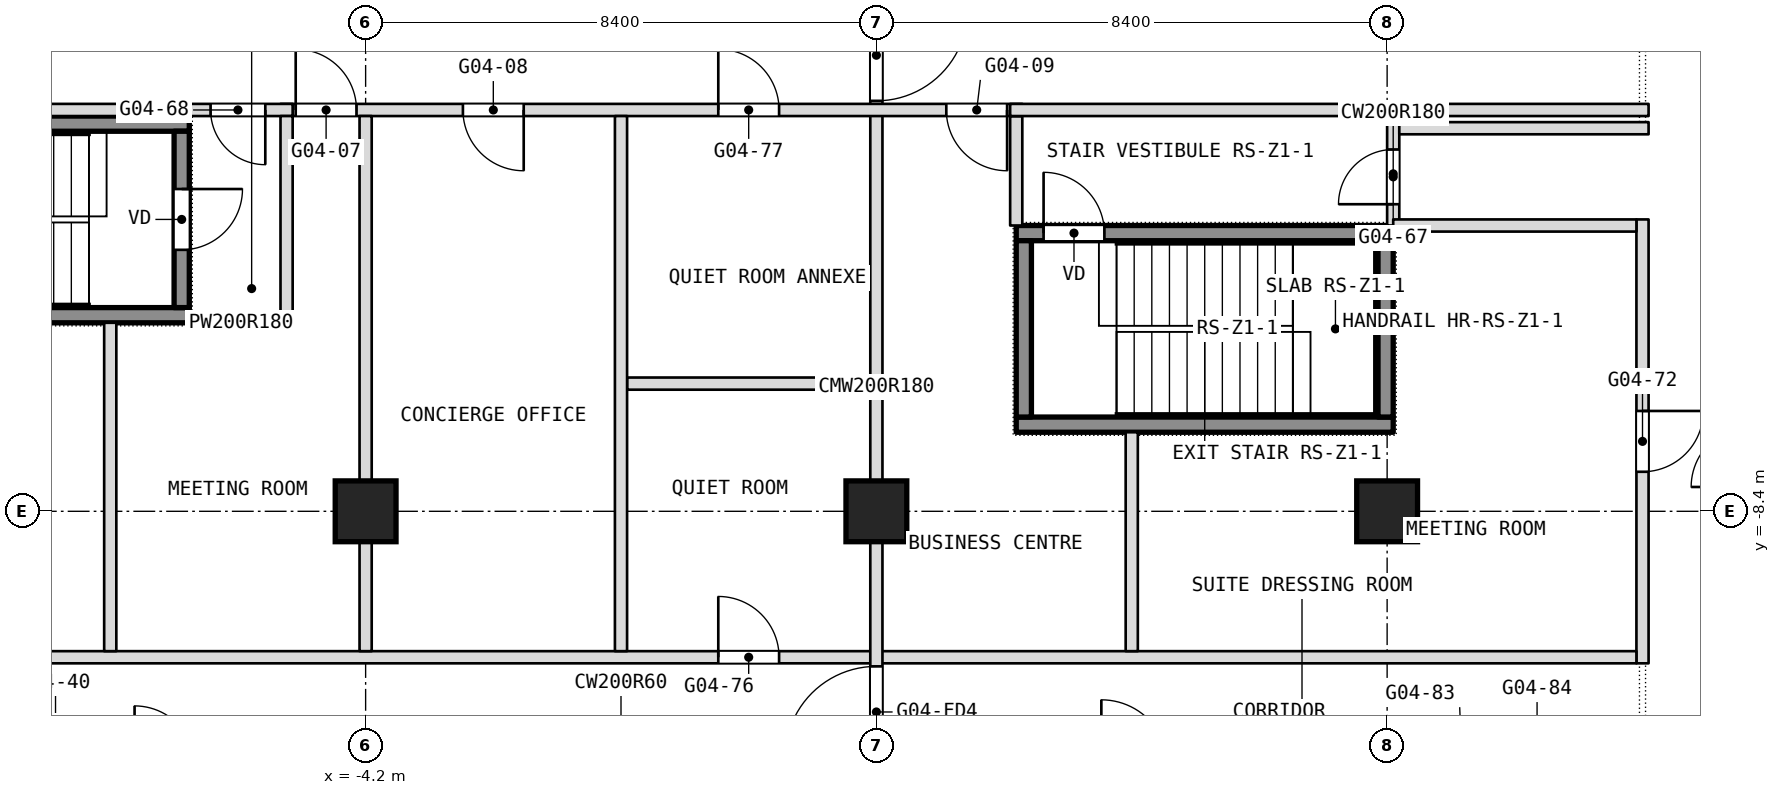
"""IFC4 building model, lengths in metres.
Left out: names, types, materials, properties, quantities, classifications, styles, units other than length and angle.
Written with IfcOpenShell. Run it as: python <this file> out.ifc"""

import sys

from ifc_helpers import new_model, si_unit, direction, frame, frame_2d, origin, origin_2d, place, context, subcontext, project, spatial, rectangle, extrude, element, fill, save


model = new_model("IFC4")
c1 = context("Model", 3, precision=1e-05, world=origin(), true_north=direction((0.0, 1.0)))
c2 = subcontext(c1, "Body", "Model", "MODEL_VIEW")
j1 = project(units=[si_unit("LENGTHUNIT", "METRE"), si_unit("PLANEANGLEUNIT", "RADIAN")], contexts=[c1])
p1 = place(None, origin())
s1 = spatial("IfcSite", under=j1, at=p1, CompositionType="ELEMENT")
p2 = place(p1, origin())
s2 = spatial("IfcBuilding", under=s1, at=p2, CompositionType="ELEMENT")
p3 = place(p2, frame((0.0, 0.0, 61.7)))
s3 = spatial("IfcBuildingStorey", under=s2, at=p3, CompositionType="ELEMENT", Elevation=61.7)
for number, where, z_axis, x_axis in (
    (1, (-4.2, -8.4, 0.0), (0.0, 0.0, 1.0), (1.0, 0.0, 0.0)),
    (2, (4.2, -8.4, 0.0), (0.0, 0.0, 1.0), (1.0, 0.0, 0.0)),
    (3, (12.6, -8.4, 0.0), (0.0, 0.0, 1.0), (1.0, 0.0, 0.0)),
):
    element("IfcColumn", number, at=place(p3, frame(where, z_axis=z_axis, x_axis=x_axis)), inside=s3, PredefinedType="COLUMN", context=c2, shape_type="SweptSolid", body=[
        extrude(rectangle(XDim=1.0, YDim=1.0, at=origin_2d()), origin(), (0.0, 0.0, 1.0), 3.6),
    ])
p4 = place(p3, frame((16.8, -10.9, 0.0), z_axis=(0.0, 0.0, 1.0), x_axis=(0.0, 1.0, 0.0)))
e4 = element("IfcWall", 4, at=p4, inside=s3, PredefinedType="PARTITIONING", context=c2, shape_type="SweptSolid", body=[
    extrude(rectangle(XDim=7.3, YDim=0.2, at=frame_2d((3.65, 0.0))), origin(), (0.0, 0.0, 1.0), 3.34),
])
p5 = place(p4, frame((3.15, 0.0, 0.0)))
e5 = element("IfcOpeningElement", 5, at=p5, cuts=e4, PredefinedType="OPENING", context=c2, shape_type="SweptSolid", body=[
    extrude(rectangle(XDim=1.0, YDim=2.1, at=frame_2d((0.5, 1.05))), frame((0.0, 0.1, 0.0), z_axis=(0.0, -1.0, 0.0), x_axis=(1.0, 0.0, 0.0)), (0.0, 0.0, 1.0), 0.2),
])
p6 = place(p3, frame((12.7, -3.7, 0.0), z_axis=(0.0, 0.0, 1.0), x_axis=(0.0, 1.0, 0.0)))
e6 = element("IfcWall", 6, at=p6, inside=s3, PredefinedType="PARTITIONING", context=c2, shape_type="SweptSolid", body=[
    extrude(rectangle(XDim=1.7, YDim=0.2, at=frame_2d((0.85, 0.0))), origin(), (0.0, 0.0, 1.0), 3.34),
])
p7 = place(p6, frame((0.35, 0.0, 0.0)))
e7 = element("IfcOpeningElement", 7, at=p7, cuts=e6, PredefinedType="OPENING", context=c2, shape_type="SweptSolid", body=[
    extrude(rectangle(XDim=0.9, YDim=2.1, at=frame_2d((0.45, 1.05))), frame((0.0, 0.1, 0.0), z_axis=(0.0, -1.0, 0.0), x_axis=(1.0, 0.0, 0.0)), (0.0, 0.0, 1.0), 0.2),
])
p8 = place(p3, frame((-16.7, -10.8, 0.0), z_axis=(0.0, 0.0, 1.0), x_axis=(1.0, 0.0, 0.0)))
e8 = element("IfcWall", 8, at=p8, inside=s3, PredefinedType="PARTITIONING", context=c2, shape_type="SweptSolid", body=[
    extrude(rectangle(XDim=33.4, YDim=0.2, at=frame_2d((16.7, 0.0))), origin(), (0.0, 0.0, 1.0), 3.34),
])
p9 = place(p8, frame((5.7, 0.0, 0.0)))
e9 = element("IfcOpeningElement", 9, at=p9, cuts=e8, PredefinedType="OPENING", context=c2, shape_type="SweptSolid", body=[
    extrude(rectangle(XDim=1.0, YDim=2.1, at=frame_2d((0.5, 1.05))), frame((0.0, 0.1, 0.0), z_axis=(0.0, -1.0, 0.0), x_axis=(1.0, 0.0, 0.0)), (0.0, 0.0, 1.0), 0.2),
])
p10 = place(p8, frame((18.3, 0.0, 0.0)))
e10 = element("IfcOpeningElement", 10, at=p10, cuts=e8, PredefinedType="OPENING", context=c2, shape_type="SweptSolid", body=[
    extrude(rectangle(XDim=1.0, YDim=2.1, at=frame_2d((0.5, 1.05))), frame((0.0, 0.1, 0.0), z_axis=(0.0, -1.0, 0.0), x_axis=(1.0, 0.0, 0.0)), (0.0, 0.0, 1.0), 0.2),
])
p11 = place(p3, frame((8.4, -10.7, 0.0), z_axis=(0.0, 0.0, 1.0), x_axis=(0.0, 1.0, 0.0)))
e11 = element("IfcWall", 11, at=p11, inside=s3, PredefinedType="PARTITIONING", context=c2, shape_type="SweptSolid", body=[
    extrude(rectangle(XDim=3.6, YDim=0.2, at=frame_2d((1.8, 0.0))), origin(), (0.0, 0.0, 1.0), 3.34),
])
p12 = place(p3, frame((6.5, -3.7, 0.0), z_axis=(0.0, 0.0, 1.0), x_axis=(0.0, 1.0, 0.0)))
e12 = element("IfcWall", 12, at=p12, inside=s3, PredefinedType="PARTITIONING", context=c2, shape_type="SweptSolid", body=[
    extrude(rectangle(XDim=1.8, YDim=0.2, at=frame_2d((0.9, 0.0))), origin(), (0.0, 0.0, 1.0), 3.34),
])
p13 = place(p3, frame((0.1, -6.3, 0.0), z_axis=(0.0, 0.0, 1.0), x_axis=(1.0, 0.0, 0.0)))
e13 = element("IfcWall", 13, at=p13, inside=s3, PredefinedType="PARTITIONING", context=c2, shape_type="SweptSolid", body=[
    extrude(rectangle(XDim=4.0, YDim=0.2, at=frame_2d((2.0, 0.0))), origin(), (0.0, 0.0, 1.0), 3.34),
])
p14 = place(p3, frame((-7.1, -5.3, 0.0), z_axis=(0.0, 0.0, 1.0), x_axis=(1.0, 0.0, 0.0)))
e14 = element("IfcWall", 14, at=p14, inside=s3, PredefinedType="PARTITIONING", context=c2, shape_type="SweptSolid", body=[
    extrude(rectangle(XDim=1.7, YDim=0.2, at=frame_2d((0.85, 0.0))), origin(), (0.0, 0.0, 1.0), 3.34),
])
p15 = place(p3, frame((4.2, -12.7, 0.0), z_axis=(0.0, 0.0, 1.0), x_axis=(0.0, 1.0, 0.0)))
e15 = element("IfcWall", 15, at=p15, inside=s3, PredefinedType="PARTITIONING", context=c2, shape_type="SweptSolid", body=[
    extrude(rectangle(XDim=12.7, YDim=0.2, at=frame_2d((6.35, 0.0))), origin(), (0.0, 0.0, 1.0), 3.34),
])
p16 = place(p15, frame((11.05, 0.0, 0.0)))
e16 = element("IfcOpeningElement", 16, at=p16, cuts=e15, PredefinedType="OPENING", context=c2, shape_type="SweptSolid", body=[
    extrude(rectangle(XDim=1.5, YDim=2.1, at=frame_2d((0.75, 1.05))), frame((0.0, 0.1, 0.0), z_axis=(0.0, -1.0, 0.0), x_axis=(1.0, 0.0, 0.0)), (0.0, 0.0, 1.0), 0.2),
])
p17 = place(p15, frame((0.25, 0.0, 0.0)))
e17 = element("IfcOpeningElement", 17, at=p17, cuts=e15, PredefinedType="OPENING", context=c2, shape_type="SweptSolid", body=[
    extrude(rectangle(XDim=1.5, YDim=2.1, at=frame_2d((0.75, 1.05))), frame((0.0, 0.1, 0.0), z_axis=(0.0, -1.0, 0.0), x_axis=(1.0, 0.0, 0.0)), (0.0, 0.0, 1.0), 0.2),
])
p18 = place(p3, frame((12.7, -3.7, 0.0), z_axis=(0.0, 0.0, 1.0), x_axis=(1.0, 0.0, 0.0)))
e18 = element("IfcWall", 18, at=p18, inside=s3, PredefinedType="PARTITIONING", context=c2, shape_type="SweptSolid", body=[
    extrude(rectangle(XDim=4.0, YDim=0.2, at=frame_2d((2.0, 0.0))), origin(), (0.0, 0.0, 1.0), 3.34),
])
p19 = place(p3, frame((12.8, -2.1, 0.0), z_axis=(0.0, 0.0, 1.0), x_axis=(1.0, 0.0, 0.0)))
e19 = element("IfcWall", 19, at=p19, inside=s3, PredefinedType="PARTITIONING", context=c2, shape_type="SweptSolid", body=[
    extrude(rectangle(XDim=4.1, YDim=0.2, at=frame_2d((2.05, 0.0))), origin(), (0.0, 0.0, 1.0), 3.34),
])
p20 = place(p3, frame((-5.6, -1.8, 0.0), z_axis=(0.0, 0.0, 1.0), x_axis=(1.0, 0.0, 0.0)))
e20 = element("IfcWall", 20, at=p20, inside=s3, PredefinedType="PARTITIONING", context=c2, shape_type="SweptSolid", body=[
    extrude(rectangle(XDim=12.2, YDim=0.2, at=frame_2d((6.1, 0.0))), origin(), (0.0, 0.0, 1.0), 3.34),
])
p21 = place(p20, frame((0.25, 0.0, 0.0)))
e21 = element("IfcOpeningElement", 21, at=p21, cuts=e20, PredefinedType="OPENING", context=c2, shape_type="SweptSolid", body=[
    extrude(rectangle(XDim=1.0, YDim=2.1, at=frame_2d((0.5, 1.05))), frame((0.0, 0.1, 0.0), z_axis=(0.0, -1.0, 0.0), x_axis=(1.0, 0.0, 0.0)), (0.0, 0.0, 1.0), 0.2),
])
p22 = place(p20, frame((3.0, 0.0, 0.0)))
e22 = element("IfcOpeningElement", 22, at=p22, cuts=e20, PredefinedType="OPENING", context=c2, shape_type="SweptSolid", body=[
    extrude(rectangle(XDim=1.0, YDim=2.1, at=frame_2d((0.5, 1.05))), frame((0.0, 0.1, 0.0), z_axis=(0.0, -1.0, 0.0), x_axis=(1.0, 0.0, 0.0)), (0.0, 0.0, 1.0), 0.2),
])
p23 = place(p20, frame((10.95, 0.0, 0.0)))
e23 = element("IfcOpeningElement", 23, at=p23, cuts=e20, PredefinedType="OPENING", context=c2, shape_type="SweptSolid", body=[
    extrude(rectangle(XDim=1.0, YDim=2.1, at=frame_2d((0.5, 1.05))), frame((0.0, 0.1, 0.0), z_axis=(0.0, -1.0, 0.0), x_axis=(1.0, 0.0, 0.0)), (0.0, 0.0, 1.0), 0.2),
])
p24 = place(p20, frame((7.2, 0.0, 0.0)))
e24 = element("IfcOpeningElement", 24, at=p24, cuts=e20, PredefinedType="OPENING", context=c2, shape_type="SweptSolid", body=[
    extrude(rectangle(XDim=1.0, YDim=2.1, at=frame_2d((0.5, 1.05))), frame((0.0, 0.1, 0.0), z_axis=(0.0, -1.0, 0.0), x_axis=(1.0, 0.0, 0.0)), (0.0, 0.0, 1.0), 0.2),
])
p25 = place(p3, frame((-13.3, -1.8, 0.0), z_axis=(0.0, 0.0, 1.0), x_axis=(1.0, 0.0, 0.0)))
e25 = element("IfcWall", 25, at=p25, inside=s3, PredefinedType="PARTITIONING", context=c2, shape_type="SweptSolid", body=[
    extrude(rectangle(XDim=7.9, YDim=0.2, at=frame_2d((3.95, 0.0))), origin(), (0.0, 0.0, 1.0), 3.34),
])
p26 = place(p25, frame((6.55, 0.0, 0.0)))
e26 = element("IfcOpeningElement", 26, at=p26, cuts=e25, PredefinedType="OPENING", context=c2, shape_type="SweptSolid", body=[
    extrude(rectangle(XDim=0.9, YDim=2.1, at=frame_2d((0.45, 1.05))), frame((0.0, 0.1, 0.0), z_axis=(0.0, -1.0, 0.0), x_axis=(1.0, 0.0, 0.0)), (0.0, 0.0, 1.0), 0.2),
])
p27 = place(p3, frame((6.4, -1.8, 0.0), z_axis=(0.0, 0.0, 1.0), x_axis=(1.0, 0.0, 0.0)))
e27 = element("IfcWall", 27, at=p27, inside=s3, PredefinedType="PARTITIONING", context=c2, shape_type="SweptSolid", body=[
    extrude(rectangle(XDim=10.5, YDim=0.2, at=frame_2d((5.25, 0.0))), origin(), (0.0, 0.0, 1.0), 3.34),
])
for number, where, z_axis, x_axis in (
    (28, (0.0, -10.7, 0.0), (0.0, 0.0, 1.0), (0.0, 1.0, 0.0)),
    (29, (-4.2, -10.7, 0.0), (0.0, 0.0, 1.0), (0.0, 1.0, 0.0)),
):
    element("IfcWall", number, at=place(p3, frame(where, z_axis=z_axis, x_axis=x_axis)), inside=s3, PredefinedType="PARTITIONING", context=c2, shape_type="SweptSolid", body=[
        extrude(rectangle(XDim=8.8, YDim=0.2, at=frame_2d((4.4, 0.0))), origin(), (0.0, 0.0, 1.0), 3.34),
    ])
p28 = place(p3, frame((-5.5, -5.2, 0.0), z_axis=(0.0, 0.0, 1.0), x_axis=(0.0, 1.0, 0.0)))
e30 = element("IfcWall", 30, at=p28, inside=s3, PredefinedType="PARTITIONING", context=c2, shape_type="SweptSolid", body=[
    extrude(rectangle(XDim=3.3, YDim=0.2, at=frame_2d((1.65, 0.0))), origin(), (0.0, 0.0, 1.0), 3.34),
])
p29 = place(p3, frame((-8.4, -10.7, 0.0), z_axis=(0.0, 0.0, 1.0), x_axis=(0.0, 1.0, 0.0)))
e31 = element("IfcWall", 31, at=p29, inside=s3, PredefinedType="PARTITIONING", context=c2, shape_type="SweptSolid", body=[
    extrude(rectangle(XDim=5.4, YDim=0.2, at=frame_2d((2.7, 0.0))), origin(), (0.0, 0.0, 1.0), 3.34),
])
p30 = place(p3, frame((6.5, -6.975, 0.1), z_axis=(0.0, 0.0, 1.0), x_axis=(1.0, 0.0, 0.0)))
e32 = element("IfcWall", 32, at=p30, inside=s3, PredefinedType="SHEAR", context=c2, shape_type="SweptSolid", body=[
    extrude(rectangle(XDim=6.2, YDim=0.25, at=frame_2d((3.1, 0.0))), origin(), (0.0, 0.0, 1.0), 3.6),
])
p31 = place(p3, frame((6.5, -3.825, 0.1), z_axis=(0.0, 0.0, 1.0), x_axis=(1.0, 0.0, 0.0)))
e33 = element("IfcWall", 33, at=p31, inside=s3, PredefinedType="SHEAR", context=c2, shape_type="SweptSolid", body=[
    extrude(rectangle(XDim=6.2, YDim=0.25, at=frame_2d((3.1, 0.0))), origin(), (0.0, 0.0, 1.0), 3.6),
])
p32 = place(p31, frame((0.45, 0.0, 0.0)))
e34 = element("IfcOpeningElement", 34, at=p32, cuts=e33, PredefinedType="OPENING", context=c2, shape_type="SweptSolid", body=[
    extrude(rectangle(XDim=1.0, YDim=2.1, at=frame_2d((0.5, 1.05))), frame((0.0, 0.125, 0.0), z_axis=(0.0, -1.0, 0.0), x_axis=(1.0, 0.0, 0.0)), (0.0, 0.0, 1.0), 0.25),
])
for number, where, z_axis, x_axis in (
    (35, (6.625, -6.85, 0.1), (0.0, 0.0, 1.0), (0.0, 1.0, 0.0)),
    (36, (12.575, -6.85, 0.1), (0.0, 0.0, 1.0), (0.0, 1.0, 0.0)),
):
    element("IfcWall", number, at=place(p3, frame(where, z_axis=z_axis, x_axis=x_axis)), inside=s3, PredefinedType="SHEAR", context=c2, shape_type="SweptSolid", body=[
        extrude(rectangle(XDim=2.9, YDim=0.25, at=frame_2d((1.45, 0.0))), origin(), (0.0, 0.0, 1.0), 3.6),
    ])
for number, where, z_axis, x_axis in (
    (37, (-13.3, -5.175, 0.1), (0.0, 0.0, 1.0), (1.0, 0.0, 0.0)),
    (38, (-13.3, -2.025, 0.1), (0.0, 0.0, 1.0), (1.0, 0.0, 0.0)),
):
    element("IfcWall", number, at=place(p3, frame(where, z_axis=z_axis, x_axis=x_axis)), inside=s3, PredefinedType="SHEAR", context=c2, shape_type="SweptSolid", body=[
        extrude(rectangle(XDim=6.2, YDim=0.25, at=frame_2d((3.1, 0.0))), origin(), (0.0, 0.0, 1.0), 3.6),
    ])
p33 = place(p3, frame((-7.225, -5.05, 0.1), z_axis=(0.0, 0.0, 1.0), x_axis=(0.0, 1.0, 0.0)))
e39 = element("IfcWall", 39, at=p33, inside=s3, PredefinedType="SHEAR", context=c2, shape_type="SweptSolid", body=[
    extrude(rectangle(XDim=2.9, YDim=0.25, at=frame_2d((1.45, 0.0))), origin(), (0.0, 0.0, 1.0), 3.6),
])
p34 = place(p33, frame((0.95, 0.0, 0.0)))
e40 = element("IfcOpeningElement", 40, at=p34, cuts=e39, PredefinedType="OPENING", context=c2, shape_type="SweptSolid", body=[
    extrude(rectangle(XDim=1.0, YDim=2.1, at=frame_2d((0.5, 1.05))), frame((0.0, 0.125, 0.0), z_axis=(0.0, -1.0, 0.0), x_axis=(1.0, 0.0, 0.0)), (0.0, 0.0, 1.0), 0.25),
])
p35 = place(p5, origin())
e41 = element("IfcDoor", 41, at=p35, inside=s3, OperationType="SINGLE_SWING_RIGHT", PredefinedType="DOOR", context=c2, shape_type="SweptSolid", body=[
    extrude(rectangle(XDim=1.0, YDim=2.1, at=frame_2d((0.5, 1.05))), frame((0.0, 0.025, 0.0), z_axis=(0.0, -1.0, 0.0), x_axis=(1.0, 0.0, 0.0)), (0.0, 0.0, 1.0), 0.05),
])
fill(e5, e41)
p36 = place(p7, origin())
e42 = element("IfcDoor", 42, at=p36, inside=s3, OperationType="SINGLE_SWING_RIGHT", PredefinedType="DOOR", context=c2, shape_type="SweptSolid", body=[
    extrude(rectangle(XDim=0.9, YDim=2.1, at=frame_2d((0.45, 1.05))), frame((0.0, 0.025, 0.0), z_axis=(0.0, -1.0, 0.0), x_axis=(1.0, 0.0, 0.0)), (0.0, 0.0, 1.0), 0.05),
])
fill(e7, e42)
p37 = place(p10, origin())
e43 = element("IfcDoor", 43, at=p37, inside=s3, OperationType="SINGLE_SWING_RIGHT", PredefinedType="DOOR", context=c2, shape_type="SweptSolid", body=[
    extrude(rectangle(XDim=1.0, YDim=2.1, at=frame_2d((0.5, 1.05))), frame((0.0, 0.025, 0.0), z_axis=(0.0, -1.0, 0.0), x_axis=(1.0, 0.0, 0.0)), (0.0, 0.0, 1.0), 0.05),
])
fill(e10, e43)
p38 = place(p21, origin())
e44 = element("IfcDoor", 44, at=p38, inside=s3, OperationType="SINGLE_SWING_RIGHT", PredefinedType="DOOR", context=c2, shape_type="SweptSolid", body=[
    extrude(rectangle(XDim=1.0, YDim=2.1, at=frame_2d((0.5, 1.05))), frame((0.0, 0.025, 0.0), z_axis=(0.0, -1.0, 0.0), x_axis=(1.0, 0.0, 0.0)), (0.0, 0.0, 1.0), 0.05),
])
fill(e21, e44)
p39 = place(p22, origin())
e45 = element("IfcDoor", 45, at=p39, inside=s3, OperationType="SINGLE_SWING_LEFT", PredefinedType="DOOR", context=c2, shape_type="SweptSolid", body=[
    extrude(rectangle(XDim=1.0, YDim=2.1, at=frame_2d((0.5, 1.05))), frame((0.0, 0.025, 0.0), z_axis=(0.0, -1.0, 0.0), x_axis=(1.0, 0.0, 0.0)), (0.0, 0.0, 1.0), 0.05),
])
fill(e22, e45)
p40 = place(p23, origin())
e46 = element("IfcDoor", 46, at=p40, inside=s3, OperationType="SINGLE_SWING_RIGHT", PredefinedType="DOOR", context=c2, shape_type="SweptSolid", body=[
    extrude(rectangle(XDim=1.0, YDim=2.1, at=frame_2d((0.5, 1.05))), frame((0.0, 0.025, 0.0), z_axis=(0.0, -1.0, 0.0), x_axis=(1.0, 0.0, 0.0)), (0.0, 0.0, 1.0), 0.05),
])
fill(e23, e46)
p41 = place(p24, origin())
e47 = element("IfcDoor", 47, at=p41, inside=s3, OperationType="SINGLE_SWING_RIGHT", PredefinedType="DOOR", context=c2, shape_type="SweptSolid", body=[
    extrude(rectangle(XDim=1.0, YDim=2.1, at=frame_2d((0.5, 1.05))), frame((0.0, 0.025, 0.0), z_axis=(0.0, -1.0, 0.0), x_axis=(1.0, 0.0, 0.0)), (0.0, 0.0, 1.0), 0.05),
])
fill(e24, e47)
p42 = place(p26, origin())
e48 = element("IfcDoor", 48, at=p42, inside=s3, OperationType="SINGLE_SWING_LEFT", PredefinedType="DOOR", context=c2, shape_type="SweptSolid", body=[
    extrude(rectangle(XDim=0.9, YDim=2.1, at=frame_2d((0.45, 1.05))), frame((0.0, 0.025, 0.0), z_axis=(0.0, -1.0, 0.0), x_axis=(1.0, 0.0, 0.0)), (0.0, 0.0, 1.0), 0.05),
])
fill(e26, e48)
p43 = place(p32, origin())
e49 = element("IfcDoor", 49, at=p43, inside=s3, OperationType="SINGLE_SWING_LEFT", PredefinedType="DOOR", context=c2, shape_type="SweptSolid", body=[
    extrude(rectangle(XDim=1.0, YDim=2.1, at=frame_2d((0.5, 1.05))), frame((0.0, 0.025, 0.0), z_axis=(0.0, -1.0, 0.0), x_axis=(1.0, 0.0, 0.0)), (0.0, 0.0, 1.0), 0.05),
])
fill(e34, e49)
p44 = place(p34, origin())
e50 = element("IfcDoor", 50, at=p44, inside=s3, OperationType="SINGLE_SWING_LEFT", PredefinedType="DOOR", context=c2, shape_type="SweptSolid", body=[
    extrude(rectangle(XDim=1.0, YDim=2.1, at=frame_2d((0.5, 1.05))), frame((0.0, 0.025, 0.0), z_axis=(0.0, -1.0, 0.0), x_axis=(1.0, 0.0, 0.0)), (0.0, 0.0, 1.0), 0.05),
])
fill(e40, e50)
p45 = place(p16, origin())
e51 = element("IfcDoor", 51, at=p45, inside=s3, OperationType="DOUBLE_DOOR_DOUBLE_SWING", PredefinedType="DOOR", context=c2, shape_type="SweptSolid", body=[
    extrude(rectangle(XDim=1.5, YDim=2.1, at=frame_2d((0.75, 1.05))), frame((0.0, 0.025, 0.0), z_axis=(0.0, -1.0, 0.0), x_axis=(1.0, 0.0, 0.0)), (0.0, 0.0, 1.0), 0.05),
])
fill(e16, e51)
p46 = place(p17, origin())
e52 = element("IfcDoor", 52, at=p46, inside=s3, OperationType="DOUBLE_DOOR_DOUBLE_SWING", PredefinedType="DOOR", context=c2, shape_type="SweptSolid", body=[
    extrude(rectangle(XDim=1.5, YDim=2.1, at=frame_2d((0.75, 1.05))), frame((0.0, 0.025, 0.0), z_axis=(0.0, -1.0, 0.0), x_axis=(1.0, 0.0, 0.0)), (0.0, 0.0, 1.0), 0.05),
])
fill(e17, e52)
save(model, sys.argv[1])
